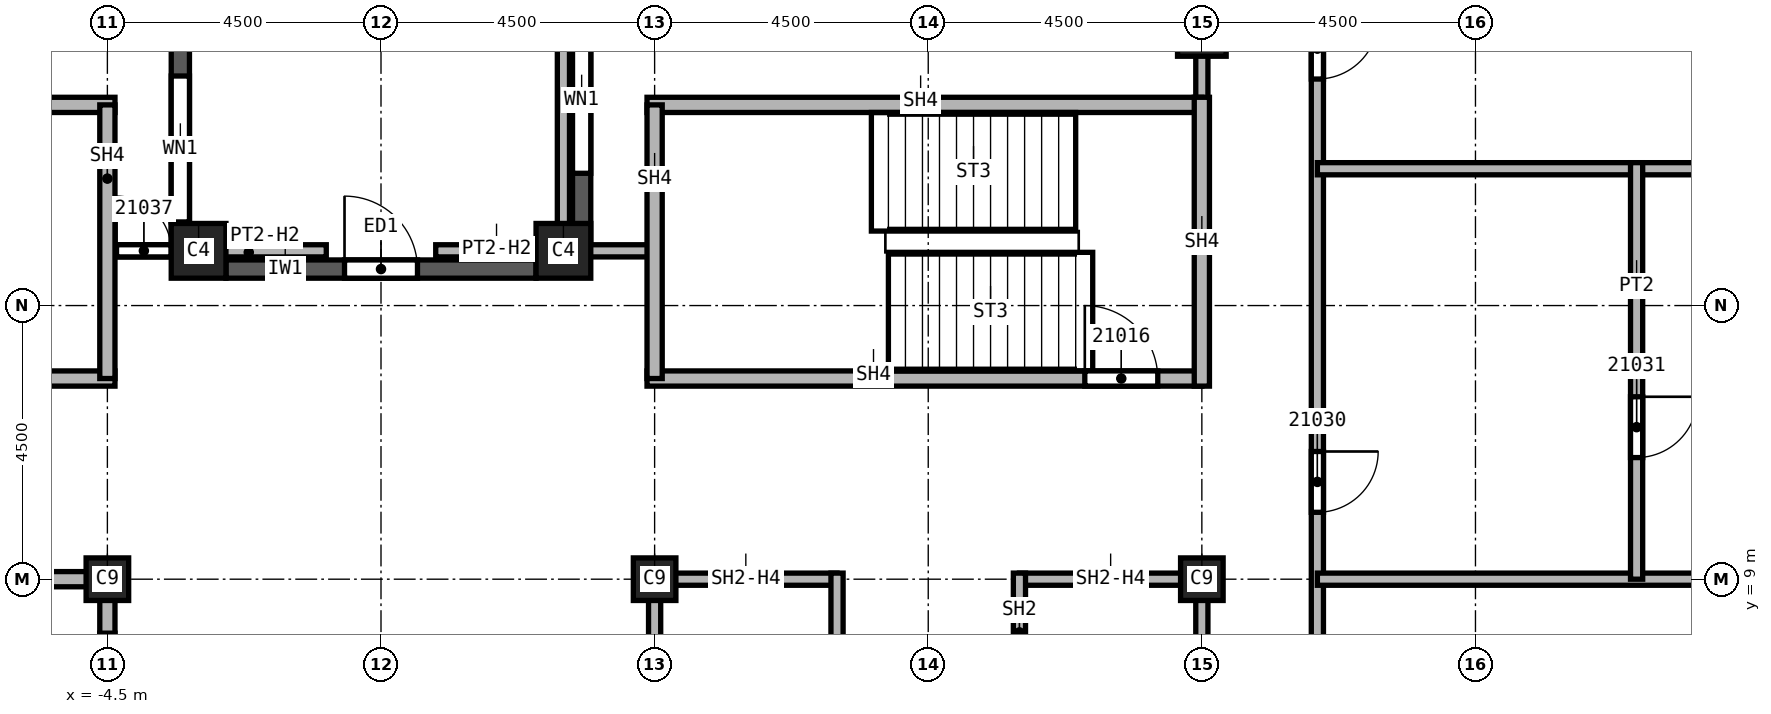
"""IFC4 building model, lengths in metres.
Left out: names, types, materials, properties, quantities, classifications, styles, units other than length and angle.
Written with IfcOpenShell. Run it as: python <this file> out.ifc"""

import sys

from ifc_helpers import new_model, si_unit, direction, frame, frame_2d, origin, origin_2d, place, context, subcontext, project, spatial, rectangle, extrude, element, fill, save


model = new_model("IFC4")
c1 = context("Model", 3, precision=1e-05, world=origin(), true_north=direction((0.0, 1.0)))
c2 = subcontext(c1, "Body", "Model", "MODEL_VIEW")
j1 = project(units=[si_unit("LENGTHUNIT", "METRE"), si_unit("PLANEANGLEUNIT", "RADIAN")], contexts=[c1])
p1 = place(None, origin())
s1 = spatial("IfcSite", under=j1, at=p1, CompositionType="ELEMENT")
p2 = place(p1, origin())
s2 = spatial("IfcBuilding", under=s1, at=p2, CompositionType="ELEMENT")
p3 = place(p2, frame((0.0, 0.0, 300.0)))
s3 = spatial("IfcBuildingStorey", under=s2, at=p3, CompositionType="ELEMENT", Elevation=300.0)
p4 = place(p3, frame((13.5, 18.0, 0.0), z_axis=(0.0, 0.0, 1.0), x_axis=(1.0, 0.0, 0.0)))
e1 = element("IfcColumn", 1, at=p4, inside=s3, PredefinedType="COLUMN", context=c2, shape_type="SweptSolid", body=[
    extrude(rectangle(XDim=0.8, YDim=0.8, at=origin_2d()), origin(), (0.0, 0.0, 1.0), 3.74),
])
for number, where, z_axis, x_axis in (
    (2, (4.5, 9.0, 0.0), (0.0, 0.0, 1.0), (1.0, 0.0, 0.0)),
    (3, (13.5, 9.0, 0.0), (0.0, 0.0, 1.0), (1.0, 0.0, 0.0)),
    (4, (-4.5, 9.0, 0.0), (0.0, 0.0, 1.0), (1.0, 0.0, 0.0)),
):
    element("IfcColumn", number, at=place(p3, frame(where, z_axis=z_axis, x_axis=x_axis)), inside=s3, PredefinedType="COLUMN", context=c2, shape_type="SweptSolid", body=[
        extrude(rectangle(XDim=0.7, YDim=0.7, at=origin_2d()), origin(), (0.0, 0.0, 1.0), 3.74),
    ])
for number, where, z_axis, x_axis in (
    (5, (3.0, 14.4, 0.0), (0.0, 0.0, 1.0), (1.0, 0.0, 0.0)),
    (6, (-3.0, 14.4, 0.0), (0.0, 0.0, 1.0), (1.0, 0.0, 0.0)),
):
    element("IfcColumn", number, at=place(p3, frame(where, z_axis=z_axis, x_axis=x_axis)), inside=s3, PredefinedType="COLUMN", context=c2, shape_type="SweptSolid", body=[
        extrude(rectangle(XDim=0.9, YDim=0.9, at=origin_2d()), origin(), (0.0, 0.0, 1.0), 3.74),
    ])
p5 = place(p3, frame((3.3, 22.95, 0.0), z_axis=(0.0, 0.0, 1.0), x_axis=(0.0, -1.0, 0.0)))
e7 = element("IfcWall", 7, at=p5, inside=s3, PredefinedType="SOLIDWALL", context=c2, shape_type="SweptSolid", body=[
    extrude(rectangle(XDim=8.5, YDim=0.3, at=frame_2d((4.25, 0.0))), origin(), (0.0, 0.0, 1.0), 3.14),
])
p6 = place(p5, frame((0.825, 0.0, 0.8)))
e8 = element("IfcOpeningElement", 8, at=p6, cuts=e7, PredefinedType="OPENING", context=c2, shape_type="SweptSolid", body=[
    extrude(rectangle(XDim=2.4, YDim=1.95, at=frame_2d((1.2, 0.975))), frame((0.0, 0.15, 0.0), z_axis=(0.0, -1.0, 0.0), x_axis=(1.0, 0.0, 0.0)), (0.0, 0.0, 1.0), 0.3),
])
p7 = place(p5, frame((4.875, 0.0, 0.8)))
e9 = element("IfcOpeningElement", 9, at=p7, cuts=e7, PredefinedType="OPENING", context=c2, shape_type="SweptSolid", body=[
    extrude(rectangle(XDim=2.4, YDim=1.95, at=frame_2d((1.2, 0.975))), frame((0.0, 0.15, 0.0), z_axis=(0.0, -1.0, 0.0), x_axis=(1.0, 0.0, 0.0)), (0.0, 0.0, 1.0), 0.3),
])
p8 = place(p3, frame((-2.55, 14.1, 0.0), z_axis=(0.0, 0.0, 1.0), x_axis=(1.0, 0.0, 0.0)))
e10 = element("IfcWall", 10, at=p8, inside=s3, PredefinedType="SOLIDWALL", context=c2, shape_type="SweptSolid", body=[
    extrude(rectangle(XDim=5.1, YDim=0.3, at=frame_2d((2.55, 0.0))), origin(), (0.0, 0.0, 1.0), 3.14),
])
p9 = place(p8, frame((1.95, 0.0, 0.0)))
e11 = element("IfcOpeningElement", 11, at=p9, cuts=e10, PredefinedType="OPENING", context=c2, shape_type="SweptSolid", body=[
    extrude(rectangle(XDim=1.2, YDim=2.4, at=frame_2d((0.6, 1.2))), frame((0.0, 0.15, 0.0), z_axis=(0.0, -1.0, 0.0), x_axis=(1.0, 0.0, 0.0)), (0.0, 0.0, 1.0), 0.3),
])
p10 = place(p3, frame((-3.3, 14.45, 0.0), z_axis=(0.0, 0.0, 1.0), x_axis=(0.0, 1.0, 0.0)))
e12 = element("IfcWall", 12, at=p10, inside=s3, PredefinedType="SOLIDWALL", context=c2, shape_type="SweptSolid", body=[
    extrude(rectangle(XDim=8.5, YDim=0.3, at=frame_2d((4.25, 0.0))), origin(), (0.0, 0.0, 1.0), 3.14),
])
p11 = place(p10, frame((0.425, 0.0, 0.8)))
e13 = element("IfcOpeningElement", 13, at=p11, cuts=e12, PredefinedType="OPENING", context=c2, shape_type="SweptSolid", body=[
    extrude(rectangle(XDim=2.4, YDim=1.95, at=frame_2d((1.2, 0.975))), frame((0.0, 0.15, 0.0), z_axis=(0.0, -1.0, 0.0), x_axis=(1.0, 0.0, 0.0)), (0.0, 0.0, 1.0), 0.3),
])
p12 = place(p10, frame((4.475, 0.0, 0.8)))
e14 = element("IfcOpeningElement", 14, at=p12, cuts=e12, PredefinedType="OPENING", context=c2, shape_type="SweptSolid", body=[
    extrude(rectangle(XDim=2.4, YDim=1.95, at=frame_2d((1.2, 0.975))), frame((0.0, 0.15, 0.0), z_axis=(0.0, -1.0, 0.0), x_axis=(1.0, 0.0, 0.0)), (0.0, 0.0, 1.0), 0.3),
])
p13 = place(p3, frame((-4.5, 14.4, 0.0), z_axis=(0.0, 0.0, 1.0), x_axis=(1.0, 0.0, 0.0)))
e15 = element("IfcWall", 15, at=p13, inside=s3, PredefinedType="PARTITIONING", context=c2, shape_type="SweptSolid", body=[
    extrude(rectangle(XDim=3.6, YDim=0.2, at=frame_2d((1.8, 0.0))), origin(), (0.0, 0.0, 1.0), 3.207),
])
p14 = place(p13, frame((0.15, 0.0, 0.0)))
e16 = element("IfcOpeningElement", 16, at=p14, cuts=e15, PredefinedType="OPENING", context=c2, shape_type="SweptSolid", body=[
    extrude(rectangle(XDim=0.9, YDim=2.1, at=frame_2d((0.45, 1.05))), frame((0.0, 0.1, 0.0), z_axis=(0.0, -1.0, 0.0), x_axis=(1.0, 0.0, 0.0)), (0.0, 0.0, 1.0), 0.2),
])
p15 = place(p3, frame((0.9, 14.4, 0.0), z_axis=(0.0, 0.0, 1.0), x_axis=(1.0, 0.0, 0.0)))
e17 = element("IfcWall", 17, at=p15, inside=s3, PredefinedType="PARTITIONING", context=c2, shape_type="SweptSolid", body=[
    extrude(rectangle(XDim=3.6, YDim=0.2, at=frame_2d((1.8, 0.0))), origin(), (0.0, 0.0, 1.0), 3.207),
])
p16 = place(p3, frame((3.0, 22.95, 0.0), z_axis=(0.0, 0.0, 1.0), x_axis=(0.0, -1.0, 0.0)))
e18 = element("IfcWall", 18, at=p16, inside=s3, PredefinedType="PARTITIONING", context=c2, shape_type="SweptSolid", body=[
    extrude(rectangle(XDim=8.55, YDim=0.2, at=frame_2d((4.275, 0.0))), origin(), (0.0, 0.0, 1.0), 2.894),
])
p17 = place(p3, frame((13.5, 16.675, 0.0), z_axis=(0.0, 0.0, 1.0), x_axis=(0.0, 1.0, 0.0)))
e19 = element("IfcWall", 19, at=p17, inside=s3, PredefinedType="PARTITIONING", context=c2, shape_type="SweptSolid", body=[
    extrude(rectangle(XDim=6.275, YDim=0.2, at=frame_2d((3.137, 0.0))), origin(), (0.0, 0.0, 1.0), 3.74),
])
p18 = place(p17, frame((2.65, 0.0, 0.0)))
e20 = element("IfcOpeningElement", 20, at=p18, cuts=e19, PredefinedType="OPENING", context=c2, shape_type="SweptSolid", body=[
    extrude(rectangle(XDim=1.0, YDim=2.1, at=frame_2d((0.5, 1.05))), frame((0.0, 0.1, 0.0), z_axis=(0.0, -1.0, 0.0), x_axis=(1.0, 0.0, 0.0)), (0.0, 0.0, 1.0), 0.2),
])
p19 = place(p3, frame((15.4, 22.95, 0.0), z_axis=(0.0, 0.0, 1.0), x_axis=(0.0, -1.0, 0.0)))
e21 = element("IfcWall", 21, at=p19, inside=s3, PredefinedType="PARTITIONING", context=c2, shape_type="SweptSolid", body=[
    extrude(rectangle(XDim=45.9, YDim=0.2, at=frame_2d((22.95, 0.0))), origin(), (0.0, 0.0, 1.0), 3.74),
])
p20 = place(p19, frame((20.7, 0.0, 0.0)))
e22 = element("IfcOpeningElement", 22, at=p20, cuts=e21, PredefinedType="OPENING", context=c2, shape_type="SweptSolid", body=[
    extrude(rectangle(XDim=1.0, YDim=2.1, at=frame_2d((0.5, 1.05))), frame((0.0, 0.1, 0.0), z_axis=(0.0, -1.0, 0.0), x_axis=(1.0, 0.0, 0.0)), (0.0, 0.0, 1.0), 0.2),
])
p21 = place(p19, frame((11.85, 0.0, 0.0)))
e23 = element("IfcOpeningElement", 23, at=p21, cuts=e21, PredefinedType="OPENING", context=c2, shape_type="SweptSolid", body=[
    extrude(rectangle(XDim=1.0, YDim=2.1, at=frame_2d((0.5, 1.05))), frame((0.0, 0.1, 0.0), z_axis=(0.0, -1.0, 0.0), x_axis=(1.0, 0.0, 0.0)), (0.0, 0.0, 1.0), 0.2),
])
p22 = place(p19, frame((4.725, 0.0, 0.0)))
e24 = element("IfcOpeningElement", 24, at=p22, cuts=e21, PredefinedType="OPENING", context=c2, shape_type="SweptSolid", body=[
    extrude(rectangle(XDim=1.0, YDim=2.1, at=frame_2d((0.5, 1.05))), frame((0.0, 0.1, 0.0), z_axis=(0.0, -1.0, 0.0), x_axis=(1.0, 0.0, 0.0)), (0.0, 0.0, 1.0), 0.2),
])
p23 = place(p19, frame((0.4, 0.0, 0.0)))
e25 = element("IfcOpeningElement", 25, at=p23, cuts=e21, PredefinedType="OPENING", context=c2, shape_type="SweptSolid", body=[
    extrude(rectangle(XDim=1.0, YDim=2.1, at=frame_2d((0.5, 1.05))), frame((0.0, 0.1, 0.0), z_axis=(0.0, -1.0, 0.0), x_axis=(1.0, 0.0, 0.0)), (0.0, 0.0, 1.0), 0.2),
])
p24 = place(p19, frame((38.85, 0.0, 0.0)))
e26 = element("IfcOpeningElement", 26, at=p24, cuts=e21, PredefinedType="OPENING", context=c2, shape_type="SweptSolid", body=[
    extrude(rectangle(XDim=1.0, YDim=2.1, at=frame_2d((0.5, 1.05))), frame((0.0, 0.1, 0.0), z_axis=(0.0, -1.0, 0.0), x_axis=(1.0, 0.0, 0.0)), (0.0, 0.0, 1.0), 0.2),
])
p25 = place(p19, frame((26.55, 0.0, 0.0)))
e27 = element("IfcOpeningElement", 27, at=p25, cuts=e21, PredefinedType="OPENING", context=c2, shape_type="SweptSolid", body=[
    extrude(rectangle(XDim=1.0, YDim=2.1, at=frame_2d((0.5, 1.05))), frame((0.0, 0.1, 0.0), z_axis=(0.0, -1.0, 0.0), x_axis=(1.0, 0.0, 0.0)), (0.0, 0.0, 1.0), 0.2),
])
for number, where, z_axis, x_axis in (
    (28, (15.4, 9.0, 0.0), (0.0, 0.0, 1.0), (1.0, 0.0, 0.0)),
    (29, (15.4, 15.75, 0.0), (0.0, 0.0, 1.0), (1.0, 0.0, 0.0)),
):
    element("IfcWall", number, at=place(p3, frame(where, z_axis=z_axis, x_axis=x_axis)), inside=s3, PredefinedType="PARTITIONING", context=c2, shape_type="SweptSolid", body=[
        extrude(rectangle(XDim=11.15, YDim=0.2, at=frame_2d((5.575, 0.0))), origin(), (0.0, 0.0, 1.0), 3.74),
    ])
p26 = place(p3, frame((20.65, 15.85, 0.0), z_axis=(0.0, 0.0, 1.0), x_axis=(0.0, -1.0, 0.0)))
e30 = element("IfcWall", 30, at=p26, inside=s3, PredefinedType="PARTITIONING", context=c2, shape_type="SweptSolid", body=[
    extrude(rectangle(XDim=6.85, YDim=0.2, at=frame_2d((3.425, 0.0))), origin(), (0.0, 0.0, 1.0), 3.74),
])
p27 = place(p26, frame((3.85, 0.0, 0.0)))
e31 = element("IfcOpeningElement", 31, at=p27, cuts=e30, PredefinedType="OPENING", context=c2, shape_type="SweptSolid", body=[
    extrude(rectangle(XDim=1.0, YDim=2.1, at=frame_2d((0.5, 1.05))), frame((0.0, 0.1, 0.0), z_axis=(0.0, -1.0, 0.0), x_axis=(1.0, 0.0, 0.0)), (0.0, 0.0, 1.0), 0.2),
])
p28 = place(p3, frame((4.5, -6.0, 0.0), z_axis=(0.0, 0.0, 1.0), x_axis=(0.0, 1.0, 0.0)))
e32 = element("IfcWall", 32, at=p28, inside=s3, PredefinedType="SOLIDWALL", context=c2, shape_type="SweptSolid", body=[
    extrude(rectangle(XDim=15.1, YDim=0.2, at=frame_2d((7.55, 0.0))), origin(), (0.0, 0.0, 1.0), 3.062),
])
p29 = place(p28, frame((4.0, 0.0, 0.0)))
e33 = element("IfcOpeningElement", 33, at=p29, cuts=e32, PredefinedType="OPENING", context=c2, shape_type="SweptSolid", body=[
    extrude(rectangle(XDim=1.1, YDim=2.1, at=frame_2d((0.55, 1.05))), frame((0.0, 0.1, 0.0), z_axis=(0.0, -1.0, 0.0), x_axis=(1.0, 0.0, 0.0)), (0.0, 0.0, 1.0), 0.2),
])
p30 = place(p28, frame((12.25, 0.0, 0.0)))
e34 = element("IfcOpeningElement", 34, at=p30, cuts=e32, PredefinedType="OPENING", context=c2, shape_type="SweptSolid", body=[
    extrude(rectangle(XDim=1.1, YDim=2.1, at=frame_2d((0.55, 1.05))), frame((0.0, 0.1, 0.0), z_axis=(0.0, -1.0, 0.0), x_axis=(1.0, 0.0, 0.0)), (0.0, 0.0, 1.0), 0.2),
])
p31 = place(p3, frame((4.5, 9.0, 0.0), z_axis=(0.0, 0.0, 1.0), x_axis=(1.0, 0.0, 0.0)))
e35 = element("IfcWall", 35, at=p31, inside=s3, PredefinedType="SOLIDWALL", context=c2, shape_type="SweptSolid", body=[
    extrude(rectangle(XDim=3.0, YDim=0.2, at=frame_2d((1.5, 0.0))), origin(), (0.0, 0.0, 1.0), 3.062),
])
p32 = place(p3, frame((7.5, 9.1, 0.0), z_axis=(0.0, 0.0, 1.0), x_axis=(0.0, -1.0, 0.0)))
e36 = element("IfcWall", 36, at=p32, inside=s3, PredefinedType="SOLIDWALL", context=c2, shape_type="SweptSolid", body=[
    extrude(rectangle(XDim=6.225, YDim=0.2, at=frame_2d((3.113, 0.0))), origin(), (0.0, 0.0, 1.0), 3.74),
])
p33 = place(p3, frame((10.5, 9.0, 0.0), z_axis=(0.0, 0.0, 1.0), x_axis=(1.0, 0.0, 0.0)))
e37 = element("IfcWall", 37, at=p33, inside=s3, PredefinedType="SOLIDWALL", context=c2, shape_type="SweptSolid", body=[
    extrude(rectangle(XDim=3.0, YDim=0.2, at=frame_2d((1.5, 0.0))), origin(), (0.0, 0.0, 1.0), 3.062),
])
p34 = place(p3, frame((10.5, 9.1, 0.0), z_axis=(0.0, 0.0, 1.0), x_axis=(0.0, -1.0, 0.0)))
e38 = element("IfcWall", 38, at=p34, inside=s3, PredefinedType="SOLIDWALL", context=c2, shape_type="SweptSolid", body=[
    extrude(rectangle(XDim=3.225, YDim=0.2, at=frame_2d((1.613, 0.0))), origin(), (0.0, 0.0, 1.0), 3.74),
])
p35 = place(p34, frame((1.75, 0.0, 0.0)))
e39 = element("IfcOpeningElement", 39, at=p35, cuts=e38, PredefinedType="OPENING", context=c2, shape_type="SweptSolid", body=[
    extrude(rectangle(XDim=1.1, YDim=2.1, at=frame_2d((0.55, 1.05))), frame((0.0, 0.1, 0.0), z_axis=(0.0, -1.0, 0.0), x_axis=(1.0, 0.0, 0.0)), (0.0, 0.0, 1.0), 0.2),
])
p36 = place(p3, frame((13.5, 9.1, 0.0), z_axis=(0.0, 0.0, 1.0), x_axis=(0.0, -1.0, 0.0)))
e40 = element("IfcWall", 40, at=p36, inside=s3, PredefinedType="SOLIDWALL", context=c2, shape_type="SweptSolid", body=[
    extrude(rectangle(XDim=3.1, YDim=0.2, at=frame_2d((1.55, 0.0))), origin(), (0.0, 0.0, 1.0), 3.062),
])
p37 = place(p3, frame((-7.5, 9.0, 0.0), z_axis=(0.0, 0.0, 1.0), x_axis=(1.0, 0.0, 0.0)))
e41 = element("IfcWall", 41, at=p37, inside=s3, PredefinedType="SOLIDWALL", context=c2, shape_type="SweptSolid", body=[
    extrude(rectangle(XDim=3.0, YDim=0.25, at=frame_2d((1.5, 0.0))), origin(), (0.0, 0.0, 1.0), 3.062),
])
p38 = place(p3, frame((-4.5, 9.125, 0.0), z_axis=(0.0, 0.0, 1.0), x_axis=(0.0, -1.0, 0.0)))
e42 = element("IfcWall", 42, at=p38, inside=s3, PredefinedType="SOLIDWALL", context=c2, shape_type="SweptSolid", body=[
    extrude(rectangle(XDim=3.125, YDim=0.25, at=frame_2d((1.562, 0.0))), origin(), (0.0, 0.0, 1.0), 3.062),
])
p39 = place(p38, frame((1.012, 0.0, 0.0)))
e43 = element("IfcOpeningElement", 43, at=p39, cuts=e42, PredefinedType="OPENING", context=c2, shape_type="SweptSolid", body=[
    extrude(rectangle(XDim=1.1, YDim=2.1, at=frame_2d((0.55, 1.05))), frame((0.0, 0.125, 0.0), z_axis=(0.0, -1.0, 0.0), x_axis=(1.0, 0.0, 0.0)), (0.0, 0.0, 1.0), 0.25),
])
p40 = place(p3, frame((-13.5, 12.3, 0.0), z_axis=(0.0, 0.0, 1.0), x_axis=(1.0, 0.0, 0.0)))
e44 = element("IfcWall", 44, at=p40, inside=s3, PredefinedType="SOLIDWALL", context=c2, shape_type="SweptSolid", body=[
    extrude(rectangle(XDim=9.125, YDim=0.25, at=frame_2d((4.562, 0.0))), origin(), (0.0, 0.0, 1.0), 3.74),
])
p41 = place(p40, frame((0.6, 0.0, 0.0)))
e45 = element("IfcOpeningElement", 45, at=p41, cuts=e44, PredefinedType="OPENING", context=c2, shape_type="SweptSolid", body=[
    extrude(rectangle(XDim=1.2, YDim=2.1, at=frame_2d((0.6, 1.05))), frame((0.0, 0.125, 0.0), z_axis=(0.0, -1.0, 0.0), x_axis=(1.0, 0.0, 0.0)), (0.0, 0.0, 1.0), 0.25),
])
p42 = place(p3, frame((-13.5, 16.8, 0.0), z_axis=(0.0, 0.0, 1.0), x_axis=(1.0, 0.0, 0.0)))
e46 = element("IfcWall", 46, at=p42, inside=s3, PredefinedType="SOLIDWALL", context=c2, shape_type="SweptSolid", body=[
    extrude(rectangle(XDim=9.125, YDim=0.25, at=frame_2d((4.562, 0.0))), origin(), (0.0, 0.0, 1.0), 3.74),
])
p43 = place(p3, frame((-4.5, 16.8, 0.0), z_axis=(0.0, 0.0, 1.0), x_axis=(0.0, -1.0, 0.0)))
e47 = element("IfcWall", 47, at=p43, inside=s3, PredefinedType="SOLIDWALL", context=c2, shape_type="SweptSolid", body=[
    extrude(rectangle(XDim=4.5, YDim=0.25, at=frame_2d((2.25, 0.0))), origin(), (0.0, 0.0, 1.0), 3.74),
])
p44 = place(p3, frame((4.375, 12.3, 0.0), z_axis=(0.0, 0.0, 1.0), x_axis=(1.0, 0.0, 0.0)))
e48 = element("IfcWall", 48, at=p44, inside=s3, PredefinedType="SOLIDWALL", context=c2, shape_type="SweptSolid", body=[
    extrude(rectangle(XDim=9.125, YDim=0.25, at=frame_2d((4.562, 0.0))), origin(), (0.0, 0.0, 1.0), 3.74),
])
p45 = place(p44, frame((7.2, 0.0, 0.0)))
e49 = element("IfcOpeningElement", 49, at=p45, cuts=e48, PredefinedType="OPENING", context=c2, shape_type="SweptSolid", body=[
    extrude(rectangle(XDim=1.2, YDim=2.1, at=frame_2d((0.6, 1.05))), frame((0.0, 0.125, 0.0), z_axis=(0.0, -1.0, 0.0), x_axis=(1.0, 0.0, 0.0)), (0.0, 0.0, 1.0), 0.25),
])
p46 = place(p3, frame((4.375, 16.8, 0.0), z_axis=(0.0, 0.0, 1.0), x_axis=(1.0, 0.0, 0.0)))
e50 = element("IfcWall", 50, at=p46, inside=s3, PredefinedType="SOLIDWALL", context=c2, shape_type="SweptSolid", body=[
    extrude(rectangle(XDim=9.125, YDim=0.25, at=frame_2d((4.562, 0.0))), origin(), (0.0, 0.0, 1.0), 3.74),
])
p47 = place(p3, frame((4.5, 12.3, 0.0), z_axis=(0.0, 0.0, 1.0), x_axis=(0.0, 1.0, 0.0)))
e51 = element("IfcWall", 51, at=p47, inside=s3, PredefinedType="SOLIDWALL", context=c2, shape_type="SweptSolid", body=[
    extrude(rectangle(XDim=4.5, YDim=0.25, at=frame_2d((2.25, 0.0))), origin(), (0.0, 0.0, 1.0), 3.74),
])
p48 = place(p3, frame((13.5, 12.175, 0.0), z_axis=(0.0, 0.0, 1.0), x_axis=(0.0, 1.0, 0.0)))
e52 = element("IfcWall", 52, at=p48, inside=s3, PredefinedType="SOLIDWALL", context=c2, shape_type="SweptSolid", body=[
    extrude(rectangle(XDim=4.75, YDim=0.25, at=frame_2d((2.375, 0.0))), origin(), (0.0, 0.0, 1.0), 3.74),
])
p49 = place(p7, origin())
e53 = element("IfcWindow", 53, at=p49, inside=s3, PartitioningType="SINGLE_PANEL", PredefinedType="WINDOW", context=c2, shape_type="SweptSolid", body=[
    extrude(rectangle(XDim=2.4, YDim=1.95, at=frame_2d((1.2, 0.975))), frame((0.0, 0.03, 0.0), z_axis=(0.0, -1.0, 0.0), x_axis=(1.0, 0.0, 0.0)), (0.0, 0.0, 1.0), 0.06),
])
fill(e9, e53)
p50 = place(p9, origin())
e54 = element("IfcDoor", 54, at=p50, inside=s3, OperationType="SINGLE_SWING_LEFT", PredefinedType="DOOR", context=c2, shape_type="SweptSolid", body=[
    extrude(rectangle(XDim=1.2, YDim=2.4, at=frame_2d((0.6, 1.2))), frame((0.0, 0.025, 0.0), z_axis=(0.0, -1.0, 0.0), x_axis=(1.0, 0.0, 0.0)), (0.0, 0.0, 1.0), 0.05),
])
fill(e11, e54)
p51 = place(p11, origin())
e55 = element("IfcWindow", 55, at=p51, inside=s3, PartitioningType="SINGLE_PANEL", PredefinedType="WINDOW", context=c2, shape_type="SweptSolid", body=[
    extrude(rectangle(XDim=2.4, YDim=1.95, at=frame_2d((1.2, 0.975))), frame((0.0, 0.03, 0.0), z_axis=(0.0, -1.0, 0.0), x_axis=(1.0, 0.0, 0.0)), (0.0, 0.0, 1.0), 0.06),
])
fill(e13, e55)
p52 = place(p45, origin())
e56 = element("IfcDoor", 56, at=p52, inside=s3, OperationType="SINGLE_SWING_LEFT", PredefinedType="DOOR", context=c2, shape_type="SweptSolid", body=[
    extrude(rectangle(XDim=1.2, YDim=2.1, at=frame_2d((0.6, 1.05))), frame((0.0, 0.025, 0.0), z_axis=(0.0, -1.0, 0.0), x_axis=(1.0, 0.0, 0.0)), (0.0, 0.0, 1.0), 0.05),
])
fill(e49, e56)
p53 = place(p21, origin())
e57 = element("IfcDoor", 57, at=p53, inside=s3, OperationType="SINGLE_SWING_LEFT", PredefinedType="DOOR", context=c2, shape_type="SweptSolid", body=[
    extrude(rectangle(XDim=1.0, YDim=2.1, at=frame_2d((0.5, 1.05))), frame((0.0, 0.025, 0.0), z_axis=(0.0, -1.0, 0.0), x_axis=(1.0, 0.0, 0.0)), (0.0, 0.0, 1.0), 0.05),
])
fill(e23, e57)
p54 = place(p27, origin())
e58 = element("IfcDoor", 58, at=p54, inside=s3, OperationType="SINGLE_SWING_RIGHT", PredefinedType="DOOR", context=c2, shape_type="SweptSolid", body=[
    extrude(rectangle(XDim=1.0, YDim=2.1, at=frame_2d((0.5, 1.05))), frame((0.0, 0.025, 0.0), z_axis=(0.0, -1.0, 0.0), x_axis=(1.0, 0.0, 0.0)), (0.0, 0.0, 1.0), 0.05),
])
fill(e31, e58)
p55 = place(p22, origin())
e59 = element("IfcDoor", 59, at=p55, inside=s3, OperationType="SINGLE_SWING_LEFT", PredefinedType="DOOR", context=c2, shape_type="SweptSolid", body=[
    extrude(rectangle(XDim=1.0, YDim=2.1, at=frame_2d((0.5, 1.05))), frame((0.0, 0.025, 0.0), z_axis=(0.0, -1.0, 0.0), x_axis=(1.0, 0.0, 0.0)), (0.0, 0.0, 1.0), 0.05),
])
fill(e24, e59)
p56 = place(p14, origin())
e60 = element("IfcDoor", 60, at=p56, inside=s3, OperationType="SINGLE_SWING_LEFT", PredefinedType="DOOR", context=c2, shape_type="SweptSolid", body=[
    extrude(rectangle(XDim=0.9, YDim=2.1, at=frame_2d((0.45, 1.05))), frame((0.0, 0.025, 0.0), z_axis=(0.0, -1.0, 0.0), x_axis=(1.0, 0.0, 0.0)), (0.0, 0.0, 1.0), 0.05),
])
fill(e16, e60)
p57 = place(p39, origin())
e61 = element("IfcDoor", 61, at=p57, inside=s3, OperationType="SLIDING_TO_LEFT", PredefinedType="DOOR", context=c2, shape_type="SweptSolid", body=[
    extrude(rectangle(XDim=1.1, YDim=2.1, at=frame_2d((0.55, 1.05))), frame((0.0, 0.025, 0.0), z_axis=(0.0, -1.0, 0.0), x_axis=(1.0, 0.0, 0.0)), (0.0, 0.0, 1.0), 0.05),
])
fill(e43, e61)
save(model, sys.argv[1])
